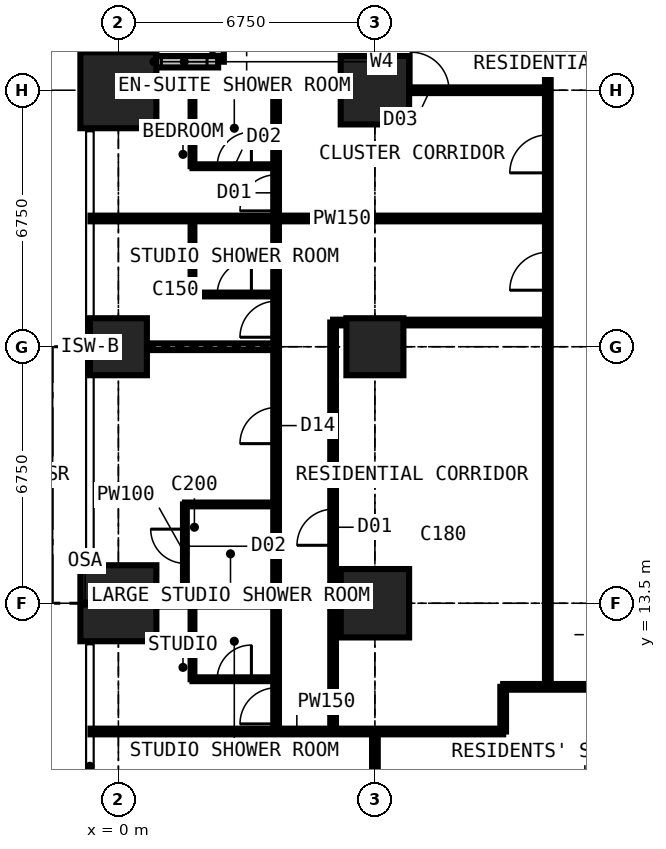
"""IFC4 building model, lengths in metres.
Left out: names, types, materials, properties, quantities, classifications, styles, units other than length and angle.
Written with IfcOpenShell. Run it as: python <this file> out.ifc"""

import sys

from ifc_helpers import new_model, si_unit, direction, frame, frame_2d, origin, origin_2d, place, context, subcontext, project, spatial, rectangle, extrude, element, fill, save


model = new_model("IFC4")
c1 = context("Model", 3, precision=1e-05, world=origin(), true_north=direction((0.0, 1.0)))
c2 = subcontext(c1, "Body", "Model", "MODEL_VIEW")
j1 = project(units=[si_unit("LENGTHUNIT", "METRE"), si_unit("PLANEANGLEUNIT", "RADIAN")], contexts=[c1])
p1 = place(None, origin())
s1 = spatial("IfcSite", under=j1, at=p1, CompositionType="ELEMENT")
p2 = place(p1, origin())
s2 = spatial("IfcBuilding", under=s1, at=p2, CompositionType="ELEMENT")
p3 = place(p2, frame((0.0, 0.0, 134.1)))
s3 = spatial("IfcBuildingStorey", under=s2, at=p3, CompositionType="ELEMENT", Elevation=134.1)
p4 = place(p3, frame((0.0, 13.5, 0.0), z_axis=(0.0, 0.0, 1.0), x_axis=(1.0, 0.0, 0.0)))
e1 = element("IfcColumn", 1, at=p4, inside=s3, PredefinedType="COLUMN", context=c2, shape_type="SweptSolid", body=[
    extrude(rectangle(XDim=2.0, YDim=2.0, at=origin_2d()), origin(), (0.0, 0.0, 1.0), 3.6),
])
p5 = place(p3, frame((0.0, 20.25, 0.0), z_axis=(0.0, 0.0, 1.0), x_axis=(1.0, 0.0, 0.0)))
e2 = element("IfcColumn", 2, at=p5, inside=s3, PredefinedType="COLUMN", context=c2, shape_type="SweptSolid", body=[
    extrude(rectangle(XDim=1.5, YDim=1.5, at=origin_2d()), origin(), (0.0, 0.0, 1.0), 3.6),
])
p6 = place(p3, frame((0.0, 27.0, 0.0), z_axis=(0.0, 0.0, 1.0), x_axis=(1.0, 0.0, 0.0)))
e3 = element("IfcColumn", 3, at=p6, inside=s3, PredefinedType="COLUMN", context=c2, shape_type="SweptSolid", body=[
    extrude(rectangle(XDim=2.0, YDim=2.0, at=origin_2d()), origin(), (0.0, 0.0, 1.0), 3.6),
])
p7 = place(p3, frame((6.75, 13.5, 0.0), z_axis=(0.0, 0.0, 1.0), x_axis=(1.0, 0.0, 0.0)))
e4 = element("IfcColumn", 4, at=p7, inside=s3, PredefinedType="COLUMN", context=c2, shape_type="SweptSolid", body=[
    extrude(rectangle(XDim=1.8, YDim=1.8, at=origin_2d()), origin(), (0.0, 0.0, 1.0), 3.6),
])
p8 = place(p3, frame((6.75, 20.25, 0.0), z_axis=(0.0, 0.0, 1.0), x_axis=(1.0, 0.0, 0.0)))
e5 = element("IfcColumn", 5, at=p8, inside=s3, PredefinedType="COLUMN", context=c2, shape_type="SweptSolid", body=[
    extrude(rectangle(XDim=1.5, YDim=1.5, at=origin_2d()), origin(), (0.0, 0.0, 1.0), 3.6),
])
p9 = place(p3, frame((6.75, 27.0, 0.0), z_axis=(0.0, 0.0, 1.0), x_axis=(1.0, 0.0, 0.0)))
e6 = element("IfcColumn", 6, at=p9, inside=s3, PredefinedType="COLUMN", context=c2, shape_type="SweptSolid", body=[
    extrude(rectangle(XDim=1.8, YDim=1.8, at=origin_2d()), origin(), (0.0, 0.0, 1.0), 3.6),
])
p10 = place(p3, frame((2.625, 31.125, 0.0), z_axis=(0.0, 0.0, 1.0), x_axis=(0.0, -1.0, 0.0)))
e7 = element("IfcWall", 7, at=p10, inside=s3, PredefinedType="SOLIDWALL", context=c2, shape_type="SweptSolid", body=[
    extrude(rectangle(XDim=3.375, YDim=0.3, at=frame_2d((1.688, 0.0))), origin(), (0.0, 0.0, 1.0), 3.3),
])
p11 = place(p10, frame((0.788, 0.0, 0.6)))
e8 = element("IfcOpeningElement", 8, at=p11, cuts=e7, PredefinedType="OPENING", context=c2, shape_type="SweptSolid", body=[
    extrude(rectangle(XDim=1.8, YDim=2.1, at=frame_2d((0.9, 1.05))), frame((0.0, 0.16, 0.0), z_axis=(0.0, -1.0, 0.0), x_axis=(1.0, 0.0, 0.0)), (0.0, 0.0, 1.0), 0.32),
])
p12 = place(p3, frame((2.625, 27.75, 0.0), z_axis=(0.0, 0.0, 1.0), x_axis=(-1.0, 0.0, 0.0)))
e9 = element("IfcWall", 9, at=p12, inside=s3, PredefinedType="SOLIDWALL", context=c2, shape_type="SweptSolid", body=[
    extrude(rectangle(XDim=3.375, YDim=0.3, at=frame_2d((1.688, 0.0))), origin(), (0.0, 0.0, 1.0), 3.3),
])
p13 = place(p12, frame((0.292, 0.0, 0.9)))
e10 = element("IfcOpeningElement", 10, at=p13, cuts=e9, PredefinedType="OPENING", context=c2, shape_type="SweptSolid", body=[
    extrude(rectangle(XDim=1.2, YDim=1.8, at=frame_2d((0.6, 0.9))), frame((0.0, 0.16, 0.0), z_axis=(0.0, -1.0, 0.0), x_axis=(1.0, 0.0, 0.0)), (0.0, 0.0, 1.0), 0.32),
])
p14 = place(p3, frame((-0.734, 10.125, 0.0), z_axis=(0.0, 0.0, 1.0), x_axis=(1.0, 0.0, 0.0)))
e11 = element("IfcWall", 11, at=p14, inside=s3, PredefinedType="PARTITIONING", context=c2, shape_type="SweptSolid", body=[
    extrude(rectangle(XDim=10.859, YDim=0.15, at=frame_2d((5.429, 0.0))), origin(), (0.0, 0.0, 1.0), 3.3),
])
for number, where, z_axis, x_axis in (
    (12, (-0.734, 13.5, 0.0), (0.0, 0.0, 1.0), (1.0, 0.0, 0.0)),
    (13, (-0.734, 20.25, 0.0), (0.0, 0.0, 1.0), (1.0, 0.0, 0.0)),
):
    element("IfcWall", number, at=place(p3, frame(where, z_axis=z_axis, x_axis=x_axis)), inside=s3, PredefinedType="PARTITIONING", context=c2, shape_type="SweptSolid", body=[
        extrude(rectangle(XDim=4.884, YDim=0.175, at=frame_2d((2.442, 0.0))), origin(), (0.0, 0.0, 1.0), 2.802),
    ])
p15 = place(p3, frame((-0.734, 23.625, 0.0), z_axis=(0.0, 0.0, 1.0), x_axis=(1.0, 0.0, 0.0)))
e14 = element("IfcWall", 14, at=p15, inside=s3, PredefinedType="PARTITIONING", context=c2, shape_type="SweptSolid", body=[
    extrude(rectangle(XDim=12.034, YDim=0.15, at=frame_2d((6.017, 0.0))), origin(), (0.0, 0.0, 1.0), 3.3),
])
p16 = place(p3, frame((-0.734, 27.0, 0.0), z_axis=(0.0, 0.0, 1.0), x_axis=(1.0, 0.0, 0.0)))
e15 = element("IfcWall", 15, at=p16, inside=s3, PredefinedType="PARTITIONING", context=c2, shape_type="SweptSolid", body=[
    extrude(rectangle(XDim=12.034, YDim=0.15, at=frame_2d((6.017, 0.0))), origin(), (0.0, 0.0, 1.0), 2.802),
])
p17 = place(p16, frame((8.434, 0.0, 0.0)))
e16 = element("IfcOpeningElement", 16, at=p17, cuts=e15, PredefinedType="OPENING", context=c2, shape_type="SweptSolid", body=[
    extrude(rectangle(XDim=1.0, YDim=2.2, at=frame_2d((0.5, 1.1))), frame((0.0, 0.085, 0.0), z_axis=(0.0, -1.0, 0.0), x_axis=(1.0, 0.0, 0.0)), (0.0, 0.0, 1.0), 0.17),
])
p18 = place(p3, frame((1.75, 13.5, 0.0), z_axis=(0.0, 0.0, 1.0), x_axis=(0.0, 1.0, 0.0)))
e17 = element("IfcWall", 17, at=p18, inside=s3, PredefinedType="PARTITIONING", context=c2, shape_type="SweptSolid", body=[
    extrude(rectangle(XDim=2.6, YDim=0.1, at=frame_2d((1.3, 0.0))), origin(), (0.0, 0.0, 1.0), 3.3),
])
p19 = place(p18, frame((1.05, 0.0, 0.0)))
e18 = element("IfcOpeningElement", 18, at=p19, cuts=e17, PredefinedType="OPENING", context=c2, shape_type="SweptSolid", body=[
    extrude(rectangle(XDim=0.9, YDim=2.2, at=frame_2d((0.45, 1.1))), frame((0.0, 0.06, 0.0), z_axis=(0.0, -1.0, 0.0), x_axis=(1.0, 0.0, 0.0)), (0.0, 0.0, 1.0), 0.12),
])
p20 = place(p3, frame((1.75, 16.1, 0.0), z_axis=(0.0, 0.0, 1.0), x_axis=(1.0, 0.0, 0.0)))
e19 = element("IfcWall", 19, at=p20, inside=s3, PredefinedType="PARTITIONING", context=c2, shape_type="SweptSolid", body=[
    extrude(rectangle(XDim=2.4, YDim=0.1, at=frame_2d((1.2, 0.0))), origin(), (0.0, 0.0, 1.0), 3.3),
])
p21 = place(p3, frame((1.95, 11.5, 0.0), z_axis=(0.0, 0.0, 1.0), x_axis=(0.0, 1.0, 0.0)))
e20 = element("IfcWall", 20, at=p21, inside=s3, PredefinedType="PARTITIONING", context=c2, shape_type="SweptSolid", body=[
    extrude(rectangle(XDim=2.0, YDim=0.1, at=frame_2d((1.0, 0.0))), origin(), (0.0, 0.0, 1.0), 3.3),
])
p22 = place(p3, frame((1.95, 11.5, 0.0), z_axis=(0.0, 0.0, 1.0), x_axis=(1.0, 0.0, 0.0)))
e21 = element("IfcWall", 21, at=p22, inside=s3, PredefinedType="PARTITIONING", context=c2, shape_type="SweptSolid", body=[
    extrude(rectangle(XDim=2.2, YDim=0.1, at=frame_2d((1.1, 0.0))), origin(), (0.0, 0.0, 1.0), 3.3),
])
p23 = place(p22, frame((0.65, 0.0, 0.0)))
e22 = element("IfcOpeningElement", 22, at=p23, cuts=e21, PredefinedType="OPENING", context=c2, shape_type="SweptSolid", body=[
    extrude(rectangle(XDim=0.9, YDim=2.2, at=frame_2d((0.45, 1.1))), frame((0.0, 0.06, 0.0), z_axis=(0.0, -1.0, 0.0), x_axis=(1.0, 0.0, 0.0)), (0.0, 0.0, 1.0), 0.12),
])
p24 = place(p3, frame((1.95, 21.625, 0.0), z_axis=(0.0, 0.0, 1.0), x_axis=(0.0, 1.0, 0.0)))
e23 = element("IfcWall", 23, at=p24, inside=s3, PredefinedType="PARTITIONING", context=c2, shape_type="SweptSolid", body=[
    extrude(rectangle(XDim=2.0, YDim=0.1, at=frame_2d((1.0, 0.0))), origin(), (0.0, 0.0, 1.0), 3.3),
])
p25 = place(p3, frame((1.95, 21.625, 0.0), z_axis=(0.0, 0.0, 1.0), x_axis=(1.0, 0.0, 0.0)))
e24 = element("IfcWall", 24, at=p25, inside=s3, PredefinedType="PARTITIONING", context=c2, shape_type="SweptSolid", body=[
    extrude(rectangle(XDim=2.2, YDim=0.1, at=frame_2d((1.1, 0.0))), origin(), (0.0, 0.0, 1.0), 3.3),
])
p26 = place(p25, frame((0.65, 0.0, 0.0)))
e25 = element("IfcOpeningElement", 25, at=p26, cuts=e24, PredefinedType="OPENING", context=c2, shape_type="SweptSolid", body=[
    extrude(rectangle(XDim=0.9, YDim=2.2, at=frame_2d((0.45, 1.1))), frame((0.0, 0.06, 0.0), z_axis=(0.0, -1.0, 0.0), x_axis=(1.0, 0.0, 0.0)), (0.0, 0.0, 1.0), 0.12),
])
p27 = place(p3, frame((1.95, 25.0, 0.0), z_axis=(0.0, 0.0, 1.0), x_axis=(0.0, 1.0, 0.0)))
e26 = element("IfcWall", 26, at=p27, inside=s3, PredefinedType="PARTITIONING", context=c2, shape_type="SweptSolid", body=[
    extrude(rectangle(XDim=2.0, YDim=0.1, at=frame_2d((1.0, 0.0))), origin(), (0.0, 0.0, 1.0), 3.3),
])
p28 = place(p3, frame((1.95, 25.0, 0.0), z_axis=(0.0, 0.0, 1.0), x_axis=(1.0, 0.0, 0.0)))
e27 = element("IfcWall", 27, at=p28, inside=s3, PredefinedType="PARTITIONING", context=c2, shape_type="SweptSolid", body=[
    extrude(rectangle(XDim=2.2, YDim=0.1, at=frame_2d((1.1, 0.0))), origin(), (0.0, 0.0, 1.0), 3.3),
])
p29 = place(p28, frame((0.65, 0.0, 0.0)))
e28 = element("IfcOpeningElement", 28, at=p29, cuts=e27, PredefinedType="OPENING", context=c2, shape_type="SweptSolid", body=[
    extrude(rectangle(XDim=0.9, YDim=2.2, at=frame_2d((0.45, 1.1))), frame((0.0, 0.06, 0.0), z_axis=(0.0, -1.0, 0.0), x_axis=(1.0, 0.0, 0.0)), (0.0, 0.0, 1.0), 0.12),
])
p30 = place(p3, frame((4.15, 10.125, 0.0), z_axis=(0.0, 0.0, 1.0), x_axis=(0.0, 1.0, 0.0)))
e29 = element("IfcWall", 29, at=p30, inside=s3, PredefinedType="PARTITIONING", context=c2, shape_type="SweptSolid", body=[
    extrude(rectangle(XDim=16.875, YDim=0.15, at=frame_2d((8.438, 0.0))), origin(), (0.0, 0.0, 1.0), 3.3),
])
p31 = place(p30, frame((13.7, 0.0, 0.0)))
e30 = element("IfcOpeningElement", 30, at=p31, cuts=e29, PredefinedType="OPENING", context=c2, shape_type="SweptSolid", body=[
    extrude(rectangle(XDim=0.95, YDim=2.2, at=frame_2d((0.475, 1.1))), frame((0.0, 0.085, 0.0), z_axis=(0.0, -1.0, 0.0), x_axis=(1.0, 0.0, 0.0)), (0.0, 0.0, 1.0), 0.17),
])
p32 = place(p30, frame((7.575, 0.0, 0.0)))
e31 = element("IfcOpeningElement", 31, at=p32, cuts=e29, PredefinedType="OPENING", context=c2, shape_type="SweptSolid", body=[
    extrude(rectangle(XDim=0.95, YDim=2.2, at=frame_2d((0.475, 1.1))), frame((0.0, 0.085, 0.0), z_axis=(0.0, -1.0, 0.0), x_axis=(1.0, 0.0, 0.0)), (0.0, 0.0, 1.0), 0.17),
])
p33 = place(p30, frame((0.2, 0.0, 0.0)))
e32 = element("IfcOpeningElement", 32, at=p33, cuts=e29, PredefinedType="OPENING", context=c2, shape_type="SweptSolid", body=[
    extrude(rectangle(XDim=0.95, YDim=2.2, at=frame_2d((0.475, 1.1))), frame((0.0, 0.085, 0.0), z_axis=(0.0, -1.0, 0.0), x_axis=(1.0, 0.0, 0.0)), (0.0, 0.0, 1.0), 0.17),
])
p34 = place(p30, frame((10.375, 0.0, 0.0)))
e33 = element("IfcOpeningElement", 33, at=p34, cuts=e29, PredefinedType="OPENING", context=c2, shape_type="SweptSolid", body=[
    extrude(rectangle(XDim=0.95, YDim=2.2, at=frame_2d((0.475, 1.1))), frame((0.0, 0.085, 0.0), z_axis=(0.0, -1.0, 0.0), x_axis=(1.0, 0.0, 0.0)), (0.0, 0.0, 1.0), 0.17),
])
p35 = place(p3, frame((5.65, 10.125, 0.0), z_axis=(0.0, 0.0, 1.0), x_axis=(0.0, 1.0, 0.0)))
e34 = element("IfcWall", 34, at=p35, inside=s3, PredefinedType="PARTITIONING", context=c2, shape_type="SweptSolid", body=[
    extrude(rectangle(XDim=10.762, YDim=0.15, at=frame_2d((5.381, 0.0))), origin(), (0.0, 0.0, 1.0), 3.3),
])
p36 = place(p35, frame((4.9, 0.0, 0.0)))
e35 = element("IfcOpeningElement", 35, at=p36, cuts=e34, PredefinedType="OPENING", context=c2, shape_type="SweptSolid", body=[
    extrude(rectangle(XDim=0.95, YDim=2.2, at=frame_2d((0.475, 1.1))), frame((0.0, 0.085, 0.0), z_axis=(0.0, -1.0, 0.0), x_axis=(1.0, 0.0, 0.0)), (0.0, 0.0, 1.0), 0.17),
])
p37 = place(p3, frame((5.65, 20.887, 0.0), z_axis=(0.0, 0.0, 1.0), x_axis=(1.0, 0.0, 0.0)))
e36 = element("IfcWall", 36, at=p37, inside=s3, PredefinedType="PARTITIONING", context=c2, shape_type="SweptSolid", body=[
    extrude(rectangle(XDim=5.65, YDim=0.15, at=frame_2d((2.825, 0.0))), origin(), (0.0, 0.0, 1.0), 3.3),
])
p38 = place(p3, frame((6.75, 4.15, 0.0), z_axis=(0.0, 0.0, 1.0), x_axis=(0.0, 1.0, 0.0)))
e37 = element("IfcWall", 37, at=p38, inside=s3, PredefinedType="PARTITIONING", context=c2, shape_type="SweptSolid", body=[
    extrude(rectangle(XDim=5.975, YDim=0.15, at=frame_2d((2.988, 0.0))), origin(), (0.0, 0.0, 1.0), 2.802),
])
p39 = place(p3, frame((10.125, 10.125, 0.0), z_axis=(0.0, 0.0, 1.0), x_axis=(0.0, 1.0, 0.0)))
e38 = element("IfcWall", 38, at=p39, inside=s3, PredefinedType="PARTITIONING", context=c2, shape_type="SweptSolid", body=[
    extrude(rectangle(XDim=1.175, YDim=0.15, at=frame_2d((0.587, 0.0))), origin(), (0.0, 0.0, 1.0), 3.3),
])
p40 = place(p3, frame((10.125, 11.3, 0.0), z_axis=(0.0, 0.0, 1.0), x_axis=(1.0, 0.0, 0.0)))
e39 = element("IfcWall", 39, at=p40, inside=s3, PredefinedType="PARTITIONING", context=c2, shape_type="SweptSolid", body=[
    extrude(rectangle(XDim=20.675, YDim=0.15, at=frame_2d((10.337, 0.0))), origin(), (0.0, 0.0, 1.0), 3.3),
])
p41 = place(p40, frame((8.375, 0.0, 0.0)))
e40 = element("IfcOpeningElement", 40, at=p41, cuts=e39, PredefinedType="OPENING", context=c2, shape_type="SweptSolid", body=[
    extrude(rectangle(XDim=1.0, YDim=2.2, at=frame_2d((0.5, 1.1))), frame((0.0, 0.085, 0.0), z_axis=(0.0, -1.0, 0.0), x_axis=(1.0, 0.0, 0.0)), (0.0, 0.0, 1.0), 0.17),
])
p42 = place(p40, frame((10.975, 0.0, 0.0)))
e41 = element("IfcOpeningElement", 41, at=p42, cuts=e39, PredefinedType="OPENING", context=c2, shape_type="SweptSolid", body=[
    extrude(rectangle(XDim=1.0, YDim=2.2, at=frame_2d((0.5, 1.1))), frame((0.0, 0.085, 0.0), z_axis=(0.0, -1.0, 0.0), x_axis=(1.0, 0.0, 0.0)), (0.0, 0.0, 1.0), 0.17),
])
p43 = place(p40, frame((3.925, 0.0, 0.0)))
e42 = element("IfcOpeningElement", 42, at=p43, cuts=e39, PredefinedType="OPENING", context=c2, shape_type="SweptSolid", body=[
    extrude(rectangle(XDim=0.95, YDim=2.2, at=frame_2d((0.475, 1.1))), frame((0.0, 0.085, 0.0), z_axis=(0.0, -1.0, 0.0), x_axis=(1.0, 0.0, 0.0)), (0.0, 0.0, 1.0), 0.17),
])
p44 = place(p3, frame((11.3, 11.3, 0.0), z_axis=(0.0, 0.0, 1.0), x_axis=(0.0, 1.0, 0.0)))
e43 = element("IfcWall", 43, at=p44, inside=s3, PredefinedType="PARTITIONING", context=c2, shape_type="SweptSolid", body=[
    extrude(rectangle(XDim=19.3, YDim=0.15, at=frame_2d((9.65, 0.0))), origin(), (0.0, 0.0, 1.0), 3.3),
])
p45 = place(p44, frame((13.525, 0.0, 0.0)))
e44 = element("IfcOpeningElement", 44, at=p45, cuts=e43, PredefinedType="OPENING", context=c2, shape_type="SweptSolid", body=[
    extrude(rectangle(XDim=1.0, YDim=2.2, at=frame_2d((0.5, 1.1))), frame((0.0, 0.085, 0.0), z_axis=(0.0, -1.0, 0.0), x_axis=(1.0, 0.0, 0.0)), (0.0, 0.0, 1.0), 0.17),
])
p46 = place(p44, frame((10.438, 0.0, 0.0)))
e45 = element("IfcOpeningElement", 45, at=p46, cuts=e43, PredefinedType="OPENING", context=c2, shape_type="SweptSolid", body=[
    extrude(rectangle(XDim=1.0, YDim=2.2, at=frame_2d((0.5, 1.1))), frame((0.0, 0.085, 0.0), z_axis=(0.0, -1.0, 0.0), x_axis=(1.0, 0.0, 0.0)), (0.0, 0.0, 1.0), 0.17),
])
p47 = place(p13, origin())
e46 = element("IfcWindow", 46, at=p47, inside=s3, PartitioningType="SINGLE_PANEL", PredefinedType="WINDOW", context=c2, shape_type="SweptSolid", body=[
    extrude(rectangle(XDim=1.2, YDim=1.8, at=frame_2d((0.6, 0.9))), frame((0.0, 0.03, 0.0), z_axis=(0.0, -1.0, 0.0), x_axis=(1.0, 0.0, 0.0)), (0.0, 0.0, 1.0), 0.06),
])
fill(e10, e46)
p48 = place(p17, origin())
e47 = element("IfcDoor", 47, at=p48, inside=s3, OperationType="SINGLE_SWING_LEFT", PredefinedType="DOOR", context=c2, shape_type="SweptSolid", body=[
    extrude(rectangle(XDim=1.0, YDim=2.2, at=frame_2d((0.5, 1.1))), frame((0.0, 0.025, 0.0), z_axis=(0.0, -1.0, 0.0), x_axis=(1.0, 0.0, 0.0)), (0.0, 0.0, 1.0), 0.05),
])
fill(e16, e47)
p49 = place(p31, origin())
e48 = element("IfcDoor", 48, at=p49, inside=s3, OperationType="SINGLE_SWING_LEFT", PredefinedType="DOOR", context=c2, shape_type="SweptSolid", body=[
    extrude(rectangle(XDim=0.95, YDim=2.2, at=frame_2d((0.475, 1.1))), frame((0.0, 0.025, 0.0), z_axis=(0.0, -1.0, 0.0), x_axis=(1.0, 0.0, 0.0)), (0.0, 0.0, 1.0), 0.05),
])
fill(e30, e48)
p50 = place(p29, origin())
e49 = element("IfcDoor", 49, at=p50, inside=s3, OperationType="SINGLE_SWING_RIGHT", PredefinedType="DOOR", context=c2, shape_type="SweptSolid", body=[
    extrude(rectangle(XDim=0.9, YDim=2.2, at=frame_2d((0.45, 1.1))), frame((0.0, 0.025, 0.0), z_axis=(0.0, -1.0, 0.0), x_axis=(1.0, 0.0, 0.0)), (0.0, 0.0, 1.0), 0.05),
])
fill(e28, e49)
p51 = place(p45, origin())
e50 = element("IfcDoor", 50, at=p51, inside=s3, OperationType="SINGLE_SWING_LEFT", PredefinedType="DOOR", context=c2, shape_type="SweptSolid", body=[
    extrude(rectangle(XDim=1.0, YDim=2.2, at=frame_2d((0.5, 1.1))), frame((0.0, 0.025, 0.0), z_axis=(0.0, -1.0, 0.0), x_axis=(1.0, 0.0, 0.0)), (0.0, 0.0, 1.0), 0.05),
])
fill(e44, e50)
p52 = place(p32, origin())
e51 = element("IfcDoor", 51, at=p52, inside=s3, OperationType="SINGLE_SWING_LEFT", PredefinedType="DOOR", context=c2, shape_type="SweptSolid", body=[
    extrude(rectangle(XDim=0.95, YDim=2.2, at=frame_2d((0.475, 1.1))), frame((0.0, 0.025, 0.0), z_axis=(0.0, -1.0, 0.0), x_axis=(1.0, 0.0, 0.0)), (0.0, 0.0, 1.0), 0.05),
])
fill(e31, e51)
p53 = place(p19, origin())
e52 = element("IfcDoor", 52, at=p53, inside=s3, OperationType="SINGLE_SWING_RIGHT", PredefinedType="DOOR", context=c2, shape_type="SweptSolid", body=[
    extrude(rectangle(XDim=0.9, YDim=2.2, at=frame_2d((0.45, 1.1))), frame((0.0, 0.025, 0.0), z_axis=(0.0, -1.0, 0.0), x_axis=(1.0, 0.0, 0.0)), (0.0, 0.0, 1.0), 0.05),
])
fill(e18, e52)
p54 = place(p33, origin())
e53 = element("IfcDoor", 53, at=p54, inside=s3, OperationType="SINGLE_SWING_LEFT", PredefinedType="DOOR", context=c2, shape_type="SweptSolid", body=[
    extrude(rectangle(XDim=0.95, YDim=2.2, at=frame_2d((0.475, 1.1))), frame((0.0, 0.025, 0.0), z_axis=(0.0, -1.0, 0.0), x_axis=(1.0, 0.0, 0.0)), (0.0, 0.0, 1.0), 0.05),
])
fill(e32, e53)
p55 = place(p23, origin())
e54 = element("IfcDoor", 54, at=p55, inside=s3, OperationType="SINGLE_SWING_RIGHT", PredefinedType="DOOR", context=c2, shape_type="SweptSolid", body=[
    extrude(rectangle(XDim=0.9, YDim=2.2, at=frame_2d((0.45, 1.1))), frame((0.0, 0.025, 0.0), z_axis=(0.0, -1.0, 0.0), x_axis=(1.0, 0.0, 0.0)), (0.0, 0.0, 1.0), 0.05),
])
fill(e22, e54)
p56 = place(p34, origin())
e55 = element("IfcDoor", 55, at=p56, inside=s3, OperationType="SINGLE_SWING_LEFT", PredefinedType="DOOR", context=c2, shape_type="SweptSolid", body=[
    extrude(rectangle(XDim=0.95, YDim=2.2, at=frame_2d((0.475, 1.1))), frame((0.0, 0.025, 0.0), z_axis=(0.0, -1.0, 0.0), x_axis=(1.0, 0.0, 0.0)), (0.0, 0.0, 1.0), 0.05),
])
fill(e33, e55)
p57 = place(p26, origin())
e56 = element("IfcDoor", 56, at=p57, inside=s3, OperationType="SINGLE_SWING_RIGHT", PredefinedType="DOOR", context=c2, shape_type="SweptSolid", body=[
    extrude(rectangle(XDim=0.9, YDim=2.2, at=frame_2d((0.45, 1.1))), frame((0.0, 0.025, 0.0), z_axis=(0.0, -1.0, 0.0), x_axis=(1.0, 0.0, 0.0)), (0.0, 0.0, 1.0), 0.05),
])
fill(e25, e56)
p58 = place(p46, origin())
e57 = element("IfcDoor", 57, at=p58, inside=s3, OperationType="SINGLE_SWING_LEFT", PredefinedType="DOOR", context=c2, shape_type="SweptSolid", body=[
    extrude(rectangle(XDim=1.0, YDim=2.2, at=frame_2d((0.5, 1.1))), frame((0.0, 0.025, 0.0), z_axis=(0.0, -1.0, 0.0), x_axis=(1.0, 0.0, 0.0)), (0.0, 0.0, 1.0), 0.05),
])
fill(e45, e57)
p59 = place(p36, origin())
e58 = element("IfcDoor", 58, at=p59, inside=s3, OperationType="SINGLE_SWING_LEFT", PredefinedType="DOOR", context=c2, shape_type="SweptSolid", body=[
    extrude(rectangle(XDim=0.95, YDim=2.2, at=frame_2d((0.475, 1.1))), frame((0.0, 0.025, 0.0), z_axis=(0.0, -1.0, 0.0), x_axis=(1.0, 0.0, 0.0)), (0.0, 0.0, 1.0), 0.05),
])
fill(e35, e58)
save(model, sys.argv[1])
